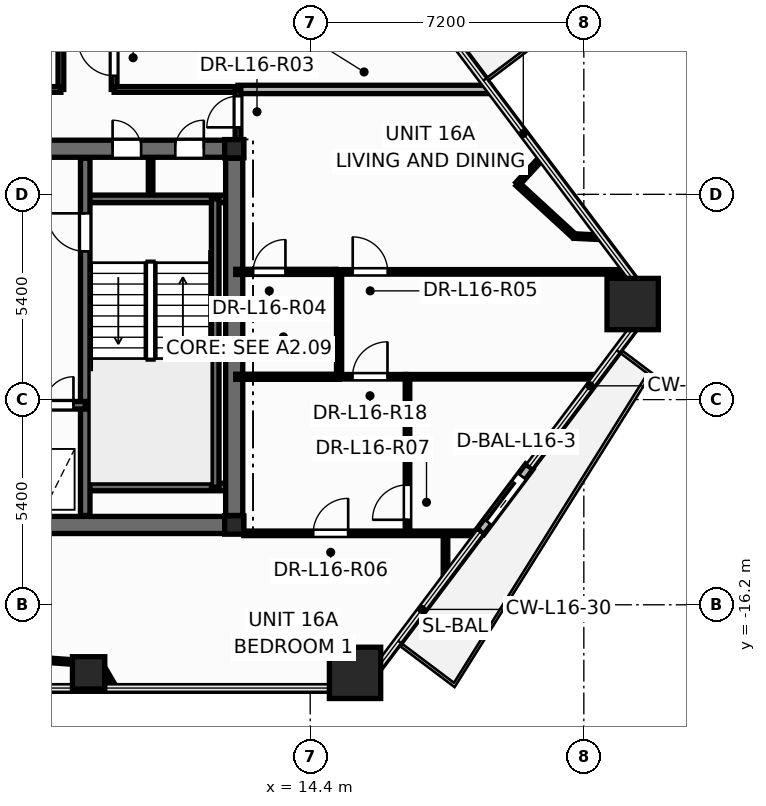
"""IFC4 building model, lengths in metres.
Left out: names, types, materials, properties, quantities, classifications, styles, units other than length and angle.
Written with IfcOpenShell. Run it as: python <this file> out.ifc"""

import sys

from ifc_helpers import new_model, si_unit, direction, frame, frame_2d, origin, origin_2d, place, context, subcontext, project, spatial, rectangle, hollow_rectangle, hollow_circle, i_section, extrude, element, fill, save


model = new_model("IFC4")
c1 = context("Model", 3, precision=1e-05, world=origin(), true_north=direction((0.0, 1.0)))
c2 = subcontext(c1, "Body", "Model", "MODEL_VIEW")
j1 = project(units=[si_unit("LENGTHUNIT", "METRE"), si_unit("PLANEANGLEUNIT", "RADIAN")], contexts=[c1])
p1 = place(None, origin())
s1 = spatial("IfcSite", under=j1, at=p1, CompositionType="ELEMENT")
p2 = place(p1, origin())
s2 = spatial("IfcBuilding", under=s1, at=p2, CompositionType="ELEMENT")
p3 = place(p2, frame((0.0, 0.0, 64.8)))
s3 = spatial("IfcBuildingStorey", under=s2, at=p3, CompositionType="ELEMENT", Elevation=64.8)
for number, where, z_axis, x_axis in (
    (1, (15.58, -17.991, 0.0), (0.0, 0.0, 1.0), (1.0, 0.0, 0.0)),
    (2, (22.885, -8.287, 0.0), (0.0, 0.0, 1.0), (1.0, 0.0, 0.0)),
):
    element("IfcColumn", number, at=place(p3, frame(where, z_axis=z_axis, x_axis=x_axis)), inside=s3, PredefinedType="COLUMN", context=c2, shape_type="SweptSolid", body=[
        extrude(hollow_rectangle(XDim=1.35, YDim=1.35, WallThickness=0.065, at=origin_2d()), origin(), (0.0, 0.0, 1.0), 3.6),
    ])
p4 = place(p3, frame((8.569, -17.991, 0.0), z_axis=(0.0, 0.0, 1.0), x_axis=(1.0, 0.0, 0.0)))
e3 = element("IfcColumn", 3, at=p4, inside=s3, PredefinedType="COLUMN", context=c2, shape_type="SweptSolid", body=[
    extrude(hollow_circle(Radius=0.425, WallThickness=0.038, at=origin_2d()), origin(), (0.0, 0.0, 1.0), 3.6),
])
for number, where, z_axis, x_axis in (
    (4, (12.4, -14.1, 0.0), (0.0, 0.0, 1.0), (1.0, 0.0, 0.0)),
    (5, (12.4, -4.2, 0.0), (0.0, 0.0, 1.0), (1.0, 0.0, 0.0)),
):
    element("IfcColumn", number, at=place(p3, frame(where, z_axis=z_axis, x_axis=x_axis)), inside=s3, PredefinedType="COLUMN", context=c2, shape_type="SweptSolid", body=[
        extrude(i_section(OverallWidth=0.5, OverallDepth=0.482, WebThickness=0.04, FlangeThickness=0.045, at=origin_2d()), origin(), (0.0, 0.0, 1.0), 3.6),
    ])
p5 = place(p3, frame((18.877, -14.276, -0.015), z_axis=(0.0, 0.0, 1.0), x_axis=(0.601441023505, 0.798917201746, 0.0)))
e6 = element("IfcWall", 6, at=p5, inside=s3, PredefinedType="STANDARD", context=c2, shape_type="SweptSolid", body=[
    extrude(rectangle(XDim=2.14, YDim=0.24, at=frame_2d((1.07, 0.0))), origin(), (0.0, 0.0, 1.0), 2.729),
])
p6 = place(p5, frame((0.32, 0.0, 0.015)))
e7 = element("IfcOpeningElement", 7, at=p6, cuts=e6, PredefinedType="OPENING", context=c2, shape_type="SweptSolid", body=[
    extrude(rectangle(XDim=1.506, YDim=2.204, at=frame_2d((0.75, 1.102))), frame((0.0, 0.13, 0.0), z_axis=(0.0, -1.0, 0.0), x_axis=(1.0, 0.0, 0.0)), (0.0, 0.0, 1.0), 0.26),
])
p7 = place(p3, frame((10.2, -5.52, 0.0), z_axis=(0.0, 0.0, 1.0), x_axis=(0.0, 1.0, 0.0)))
e8 = element("IfcWall", 8, at=p7, inside=s3, PredefinedType="PARTITIONING", context=c2, shape_type="SweptSolid", body=[
    extrude(rectangle(XDim=1.12, YDim=0.12, at=frame_2d((0.56, 0.0))), origin(), (0.0, 0.0, 1.0), 3.35),
])
p8 = place(p3, frame((-12.65, -14.1, 0.0), z_axis=(0.0, 0.0, 1.0), x_axis=(1.0, 0.0, 0.0)))
e9 = element("IfcWall", 9, at=p8, inside=s3, PredefinedType="SHEAR", context=c2, shape_type="SweptSolid", body=[
    extrude(rectangle(XDim=25.3, YDim=0.45, at=frame_2d((12.65, 0.0))), origin(), (0.0, 0.0, 1.0), 3.6),
])
p9 = place(p3, frame((-12.65, -4.2, 0.0), z_axis=(0.0, 0.0, 1.0), x_axis=(1.0, 0.0, 0.0)))
e10 = element("IfcWall", 10, at=p9, inside=s3, PredefinedType="SHEAR", context=c2, shape_type="SweptSolid", body=[
    extrude(rectangle(XDim=25.3, YDim=0.45, at=frame_2d((12.65, 0.0))), origin(), (0.0, 0.0, 1.0), 3.6),
])
p10 = place(p9, frame((1.85, 0.0, 0.0)))
e11 = element("IfcOpeningElement", 11, at=p10, cuts=e10, PredefinedType="OPENING", context=c2, shape_type="SweptSolid", body=[
    extrude(rectangle(XDim=0.756, YDim=2.054, at=frame_2d((0.375, 1.027))), frame((0.0, 0.235, 0.0), z_axis=(0.0, -1.0, 0.0), x_axis=(1.0, 0.0, 0.0)), (0.0, 0.0, 1.0), 0.47),
])
p11 = place(p9, frame((21.85, 0.0, 0.0)))
e12 = element("IfcOpeningElement", 12, at=p11, cuts=e10, PredefinedType="OPENING", context=c2, shape_type="SweptSolid", body=[
    extrude(rectangle(XDim=0.756, YDim=2.054, at=frame_2d((0.375, 1.027))), frame((0.0, 0.235, 0.0), z_axis=(0.0, -1.0, 0.0), x_axis=(1.0, 0.0, 0.0)), (0.0, 0.0, 1.0), 0.47),
])
p12 = place(p9, frame((23.5, 0.0, 0.0)))
e13 = element("IfcOpeningElement", 13, at=p12, cuts=e10, PredefinedType="OPENING", context=c2, shape_type="SweptSolid", body=[
    extrude(rectangle(XDim=0.756, YDim=2.054, at=frame_2d((0.375, 1.027))), frame((0.0, 0.235, 0.0), z_axis=(0.0, -1.0, 0.0), x_axis=(1.0, 0.0, 0.0)), (0.0, 0.0, 1.0), 0.47),
])
p13 = place(p9, frame((5.85, 0.0, 0.0)))
e14 = element("IfcOpeningElement", 14, at=p13, cuts=e10, PredefinedType="OPENING", context=c2, shape_type="SweptSolid", body=[
    extrude(rectangle(XDim=1.006, YDim=2.104, at=frame_2d((0.5, 1.052))), frame((0.0, 0.235, 0.0), z_axis=(0.0, -1.0, 0.0), x_axis=(1.0, 0.0, 0.0)), (0.0, 0.0, 1.0), 0.47),
])
p14 = place(p9, frame((10.35, 0.0, 0.0)))
e15 = element("IfcOpeningElement", 15, at=p14, cuts=e10, PredefinedType="OPENING", context=c2, shape_type="SweptSolid", body=[
    extrude(rectangle(XDim=1.406, YDim=2.154, at=frame_2d((0.7, 1.077))), frame((0.0, 0.235, 0.0), z_axis=(0.0, -1.0, 0.0), x_axis=(1.0, 0.0, 0.0)), (0.0, 0.0, 1.0), 0.47),
])
p15 = place(p9, frame((18.45, 0.0, 0.0)))
e16 = element("IfcOpeningElement", 16, at=p15, cuts=e10, PredefinedType="OPENING", context=c2, shape_type="SweptSolid", body=[
    extrude(rectangle(XDim=1.006, YDim=2.104, at=frame_2d((0.5, 1.052))), frame((0.0, 0.235, 0.0), z_axis=(0.0, -1.0, 0.0), x_axis=(1.0, 0.0, 0.0)), (0.0, 0.0, 1.0), 0.47),
])
for number, where, z_axis, x_axis in (
    (17, (8.48, -5.52, 0.0), (0.0, 0.0, 1.0), (1.0, 0.0, 0.0)),
    (18, (8.48, -13.1, 0.0), (0.0, 0.0, 1.0), (1.0, 0.0, 0.0)),
):
    element("IfcWall", number, at=place(p3, frame(where, z_axis=z_axis, x_axis=x_axis)), inside=s3, PredefinedType="SOLIDWALL", context=c2, shape_type="SweptSolid", body=[
        extrude(rectangle(XDim=3.87, YDim=0.2, at=frame_2d((1.935, 0.0))), origin(), (0.0, 0.0, 1.0), 3.6),
    ])
p16 = place(p3, frame((11.9, -13.1, 0.0), z_axis=(0.0, 0.0, 1.0), x_axis=(0.0, 1.0, 0.0)))
e19 = element("IfcWall", 19, at=p16, inside=s3, PredefinedType="SOLIDWALL", context=c2, shape_type="SweptSolid", body=[
    extrude(rectangle(XDim=7.58, YDim=0.2, at=frame_2d((3.79, 0.0))), origin(), (0.0, 0.0, 1.0), 3.6),
])
p17 = place(p3, frame((8.48, -13.85, 0.0), z_axis=(0.0, 0.0, 1.0), x_axis=(0.0, 1.0, 0.0)))
e20 = element("IfcWall", 20, at=p17, inside=s3, PredefinedType="SHEAR", context=c2, shape_type="SweptSolid", body=[
    extrude(rectangle(XDim=9.4, YDim=0.25, at=frame_2d((4.7, 0.0))), origin(), (0.0, 0.0, 1.0), 3.6),
])
p18 = place(p17, frame((6.95, 0.0, 0.0)))
e21 = element("IfcOpeningElement", 21, at=p18, cuts=e20, PredefinedType="OPENING", context=c2, shape_type="SweptSolid", body=[
    extrude(rectangle(XDim=1.006, YDim=2.104, at=frame_2d((0.5, 1.052))), frame((0.0, 0.135, 0.0), z_axis=(0.0, -1.0, 0.0), x_axis=(1.0, 0.0, 0.0)), (0.0, 0.0, 1.0), 0.27),
])
p19 = place(p3, frame((5.12, -10.95, 0.0), z_axis=(0.0, 0.0, 1.0), x_axis=(1.0, 0.0, 0.0)))
e22 = element("IfcWall", 22, at=p19, inside=s3, PredefinedType="SOLIDWALL", context=c2, shape_type="SweptSolid", body=[
    extrude(rectangle(XDim=3.36, YDim=0.2, at=frame_2d((1.68, 0.0))), origin(), (0.0, 0.0, 1.0), 3.6),
])
p20 = place(p19, frame((0.42, 0.0, 0.0)))
e23 = element("IfcOpeningElement", 23, at=p20, cuts=e22, PredefinedType="OPENING", context=c2, shape_type="SweptSolid", body=[
    extrude(rectangle(XDim=1.106, YDim=2.104, at=frame_2d((0.55, 1.052))), frame((0.0, 0.11, 0.0), z_axis=(0.0, -1.0, 0.0), x_axis=(1.0, 0.0, 0.0)), (0.0, 0.0, 1.0), 0.22),
])
p21 = place(p19, frame((2.3, 0.0, 0.0)))
e24 = element("IfcOpeningElement", 24, at=p21, cuts=e22, PredefinedType="OPENING", context=c2, shape_type="SweptSolid", body=[
    extrude(rectangle(XDim=0.756, YDim=2.054, at=frame_2d((0.375, 1.027))), frame((0.0, 0.11, 0.0), z_axis=(0.0, -1.0, 0.0), x_axis=(1.0, 0.0, 0.0)), (0.0, 0.0, 1.0), 0.22),
])
p22 = place(p3, frame((12.4, -13.85, 0.0), z_axis=(0.0, 0.0, 1.0), x_axis=(0.0, 1.0, 0.0)))
e25 = element("IfcWall", 25, at=p22, inside=s3, PredefinedType="SHEAR", context=c2, shape_type="SweptSolid", body=[
    extrude(rectangle(XDim=9.4, YDim=0.45, at=frame_2d((4.7, 0.0))), origin(), (0.0, 0.0, 1.0), 3.6),
])
p23 = place(p3, frame((15.08, -7.44, 0.0), z_axis=(0.0, 0.0, 1.0), x_axis=(1.0, 0.0, 0.0)))
e26 = element("IfcWall", 26, at=p23, inside=s3, PredefinedType="PARTITIONING", context=c2, shape_type="SweptSolid", body=[
    extrude(rectangle(XDim=7.669, YDim=0.12, at=frame_2d((3.834, 0.0))), origin(), (0.0, 0.0, 1.0), 2.325),
])
p24 = place(p23, frame((0.438, 0.0, 0.0)))
e27 = element("IfcOpeningElement", 27, at=p24, cuts=e26, PredefinedType="OPENING", context=c2, shape_type="SweptSolid", body=[
    extrude(rectangle(XDim=0.926, YDim=2.104, at=frame_2d((0.46, 1.052))), frame((0.0, 0.07, 0.0), z_axis=(0.0, -1.0, 0.0), x_axis=(1.0, 0.0, 0.0)), (0.0, 0.0, 1.0), 0.14),
])
p25 = place(p3, frame((9.24, -2.64, 0.0), z_axis=(0.0, 0.0, 1.0), x_axis=(0.0, 1.0, 0.0)))
e28 = element("IfcWall", 28, at=p25, inside=s3, PredefinedType="PARTITIONING", context=c2, shape_type="SweptSolid", body=[
    extrude(rectangle(XDim=7.1, YDim=0.15, at=frame_2d((3.55, 0.0))), origin(), (0.0, 0.0, 1.0), 2.325),
])
p26 = place(p25, frame((0.36, 0.0, 0.0)))
e29 = element("IfcOpeningElement", 29, at=p26, cuts=e28, PredefinedType="OPENING", context=c2, shape_type="SweptSolid", body=[
    extrude(rectangle(XDim=0.956, YDim=2.104, at=frame_2d((0.475, 1.052))), frame((0.0, 0.085, 0.0), z_axis=(0.0, -1.0, 0.0), x_axis=(1.0, 0.0, 0.0)), (0.0, 0.0, 1.0), 0.17),
])
p27 = place(p3, frame((12.5, -2.64, 0.0), z_axis=(0.0, 0.0, 1.0), x_axis=(1.0, 0.0, 0.0)))
e30 = element("IfcWall", 30, at=p27, inside=s3, PredefinedType="PARTITIONING", context=c2, shape_type="SweptSolid", body=[
    extrude(rectangle(XDim=6.635, YDim=0.22, at=frame_2d((3.318, 0.0))), origin(), (0.0, 0.0, 1.0), 2.713),
])
p28 = place(p3, frame((12.652, -14.32, 0.0), z_axis=(0.0, 0.0, 1.0), x_axis=(1.0, 0.0, 0.0)))
e31 = element("IfcWall", 31, at=p28, inside=s3, PredefinedType="PARTITIONING", context=c2, shape_type="SweptSolid", body=[
    extrude(rectangle(XDim=6.192, YDim=0.12, at=frame_2d((3.096, 0.0))), origin(), (0.0, 0.0, 1.0), 2.713),
])
p29 = place(p28, frame((1.827, 0.0, 0.0)))
e32 = element("IfcOpeningElement", 32, at=p29, cuts=e31, PredefinedType="OPENING", context=c2, shape_type="SweptSolid", body=[
    extrude(rectangle(XDim=0.926, YDim=2.104, at=frame_2d((0.46, 1.052))), frame((0.0, 0.07, 0.0), z_axis=(0.0, -1.0, 0.0), x_axis=(1.0, 0.0, 0.0)), (0.0, 0.0, 1.0), 0.14),
])
p30 = place(p3, frame((7.84, -2.64, 0.0), z_axis=(0.0, 0.0, 1.0), x_axis=(0.0, 1.0, 0.0)))
e33 = element("IfcWall", 33, at=p30, inside=s3, PredefinedType="PARTITIONING", context=c2, shape_type="SweptSolid", body=[
    extrude(rectangle(XDim=8.84, YDim=0.15, at=frame_2d((4.42, 0.0))), origin(), (0.0, 0.0, 1.0), 2.325),
])
p31 = place(p3, frame((16.92, -10.2, 0.0), z_axis=(0.0, 0.0, 1.0), x_axis=(1.0, 0.0, 0.0)))
e34 = element("IfcWall", 34, at=p31, inside=s3, PredefinedType="PARTITIONING", context=c2, shape_type="SweptSolid", body=[
    extrude(rectangle(XDim=5.026, YDim=0.12, at=frame_2d((2.513, 0.0))), origin(), (0.0, 0.0, 1.0), 2.713),
])
p32 = place(p3, frame((16.96, -14.32, 0.0), z_axis=(0.0, 0.0, 1.0), x_axis=(0.0, 1.0, 0.0)))
e35 = element("IfcWall", 35, at=p32, inside=s3, PredefinedType="PARTITIONING", context=c2, shape_type="SweptSolid", body=[
    extrude(rectangle(XDim=4.12, YDim=0.12, at=frame_2d((2.06, 0.0))), origin(), (0.0, 0.0, 1.0), 3.35),
])
p33 = place(p32, frame((0.357, 0.0, 0.0)))
e36 = element("IfcOpeningElement", 36, at=p33, cuts=e35, PredefinedType="OPENING", context=c2, shape_type="SweptSolid", body=[
    extrude(rectangle(XDim=0.926, YDim=2.104, at=frame_2d((0.46, 1.052))), frame((0.0, 0.07, 0.0), z_axis=(0.0, -1.0, 0.0), x_axis=(1.0, 0.0, 0.0)), (0.0, 0.0, 1.0), 0.14),
])
p34 = place(p3, frame((5.595, -17.522, 0.0), z_axis=(0.0, 0.0, 1.0), x_axis=(0.997421304673, -0.071768662969, 0.0)))
e37 = element("IfcWall", 37, at=p34, inside=s3, PredefinedType="PARTITIONING", context=c2, shape_type="SweptSolid", body=[
    extrude(rectangle(XDim=3.293, YDim=0.12, at=frame_2d((1.646, 0.0))), origin(), (0.0, 0.0, 1.0), 2.325),
])
p35 = place(p3, frame((9.24, -2.64, 0.0), z_axis=(0.0, 0.0, 1.0), x_axis=(1.0, 0.0, 0.0)))
e38 = element("IfcWall", 38, at=p35, inside=s3, PredefinedType="PARTITIONING", context=c2, shape_type="SweptSolid", body=[
    extrude(rectangle(XDim=3.26, YDim=0.15, at=frame_2d((1.63, 0.0))), origin(), (0.0, 0.0, 1.0), 3.35),
])
p36 = place(p3, frame((12.44, -7.44, 0.0), z_axis=(0.0, 0.0, 1.0), x_axis=(1.0, 0.0, 0.0)))
e39 = element("IfcWall", 39, at=p36, inside=s3, PredefinedType="PARTITIONING", context=c2, shape_type="SweptSolid", body=[
    extrude(rectangle(XDim=2.638, YDim=0.135, at=frame_2d((1.319, 0.0))), origin(), (0.0, 0.0, 1.0), 2.713),
])
p37 = place(p36, frame((0.458, 0.0, 0.0)))
e40 = element("IfcOpeningElement", 40, at=p37, cuts=e39, PredefinedType="OPENING", context=c2, shape_type="SweptSolid", body=[
    extrude(rectangle(XDim=0.856, YDim=2.104, at=frame_2d((0.425, 1.052))), frame((0.0, 0.078, 0.0), z_axis=(0.0, -1.0, 0.0), x_axis=(1.0, 0.0, 0.0)), (0.0, 0.0, 1.0), 0.155),
])
p38 = place(p3, frame((15.16, -10.2, 0.0), z_axis=(0.0, 0.0, 1.0), x_axis=(0.0, 1.0, 0.0)))
e41 = element("IfcWall", 41, at=p38, inside=s3, PredefinedType="PARTITIONING", context=c2, shape_type="SweptSolid", body=[
    extrude(rectangle(XDim=2.76, YDim=0.135, at=frame_2d((1.38, 0.0))), origin(), (0.0, 0.0, 1.0), 3.35),
])
p39 = place(p3, frame((12.44, -10.2, 0.0), z_axis=(0.0, 0.0, 1.0), x_axis=(1.0, 0.0, 0.0)))
e42 = element("IfcWall", 42, at=p39, inside=s3, PredefinedType="PARTITIONING", context=c2, shape_type="SweptSolid", body=[
    extrude(rectangle(XDim=2.72, YDim=0.135, at=frame_2d((1.36, 0.0))), origin(), (0.0, 0.0, 1.0), 2.713),
])
p40 = place(p3, frame((6.002, -2.64, 0.0), z_axis=(0.0, 0.0, 1.0), x_axis=(1.0, 0.0, 0.0)))
e43 = element("IfcWall", 43, at=p40, inside=s3, PredefinedType="PARTITIONING", context=c2, shape_type="SweptSolid", body=[
    extrude(rectangle(XDim=1.838, YDim=0.15, at=frame_2d((0.919, 0.0))), origin(), (0.0, 0.0, 1.0), 2.325),
])
p41 = place(p3, frame((15.16, -10.2, 0.0), z_axis=(0.0, 0.0, 1.0), x_axis=(1.0, 0.0, 0.0)))
e44 = element("IfcWall", 44, at=p41, inside=s3, PredefinedType="PARTITIONING", context=c2, shape_type="SweptSolid", body=[
    extrude(rectangle(XDim=1.758, YDim=0.12, at=frame_2d((0.879, 0.0))), origin(), (0.0, 0.0, 1.0), 3.35),
])
p42 = place(p41, frame((0.353, 0.0, 0.0)))
e45 = element("IfcOpeningElement", 45, at=p42, cuts=e44, PredefinedType="OPENING", context=c2, shape_type="SweptSolid", body=[
    extrude(rectangle(XDim=0.926, YDim=2.104, at=frame_2d((0.46, 1.052))), frame((0.0, 0.07, 0.0), z_axis=(0.0, -1.0, 0.0), x_axis=(1.0, 0.0, 0.0)), (0.0, 0.0, 1.0), 0.14),
])
p43 = place(p3, frame((12.5, -4.24, 0.0), z_axis=(0.0, 0.0, 1.0), x_axis=(0.0, 1.0, 0.0)))
e46 = element("IfcWall", 46, at=p43, inside=s3, PredefinedType="PARTITIONING", context=c2, shape_type="SweptSolid", body=[
    extrude(rectangle(XDim=1.6, YDim=0.15, at=frame_2d((0.8, 0.0))), origin(), (0.0, 0.0, 1.0), 2.325),
])
p44 = place(p43, frame((0.602, 0.0, 0.0)))
e47 = element("IfcOpeningElement", 47, at=p44, cuts=e46, PredefinedType="OPENING", context=c2, shape_type="SweptSolid", body=[
    extrude(rectangle(XDim=0.826, YDim=2.104, at=frame_2d((0.41, 1.052))), frame((0.0, 0.085, 0.0), z_axis=(0.0, -1.0, 0.0), x_axis=(1.0, 0.0, 0.0)), (0.0, 0.0, 1.0), 0.17),
])
p45 = place(p3, frame((21.347, -6.497, 0.0), z_axis=(0.0, 0.0, 1.0), x_axis=(-0.736728490611, 0.67618868012, 0.0)))
e48 = element("IfcWall", 48, at=p45, inside=s3, PredefinedType="PARTITIONING", context=c2, shape_type="SweptSolid", body=[
    extrude(rectangle(XDim=2.024, YDim=0.12, at=frame_2d((1.012, 0.0))), origin(), (0.0, 0.0, 1.0), 3.35),
])
p46 = place(p3, frame((17.96, -15.494, 0.0), z_axis=(0.0, 0.0, 1.0), x_axis=(0.0, 1.0, 0.0)))
e49 = element("IfcWall", 49, at=p46, inside=s3, PredefinedType="PARTITIONING", context=c2, shape_type="SweptSolid", body=[
    extrude(rectangle(XDim=1.174, YDim=0.12, at=frame_2d((0.587, 0.0))), origin(), (0.0, 0.0, 1.0), 2.713),
])
p47 = place(p3, frame((19.855, -5.128, 0.0), z_axis=(0.0, 0.0, 1.0), x_axis=(0.676154076812, 0.736760248935, 0.0)))
e50 = element("IfcWall", 50, at=p47, inside=s3, PredefinedType="PARTITIONING", context=c2, shape_type="SweptSolid", body=[
    extrude(rectangle(XDim=0.927, YDim=0.12, at=frame_2d((0.463, 0.0))), origin(), (0.0, 0.0, 1.0), 2.713),
])
p48 = place(p3, frame((8.879, -17.759, 0.0), z_axis=(0.0, 0.0, 1.0), x_axis=(0.504649985928, -0.863324036329, 0.0)))
e51 = element("IfcWall", 51, at=p48, inside=s3, PredefinedType="PARTITIONING", context=c2, shape_type="SweptSolid", body=[
    extrude(rectangle(XDim=0.721, YDim=0.12, at=frame_2d((0.36, 0.0))), origin(), (0.0, 0.0, 1.0), 2.325),
])
p49 = place(p3, frame((22.053, -6.532, 0.0), z_axis=(0.0, 0.0, 1.0), x_axis=(-0.998778903867, 0.049403453218, 0.0)))
e52 = element("IfcWall", 52, at=p49, inside=s3, PredefinedType="PARTITIONING", context=c2, shape_type="SweptSolid", body=[
    extrude(rectangle(XDim=0.707, YDim=0.12, at=frame_2d((0.354, 0.0))), origin(), (0.0, 0.0, 1.0), 2.713),
])
p50 = place(p6, origin())
e53 = element("IfcDoor", 53, at=p50, inside=s3, OperationType="SLIDING_TO_RIGHT", PredefinedType="DOOR", context=c2, shape_type="SweptSolid", body=[
    extrude(rectangle(XDim=1.5, YDim=2.2, at=frame_2d((0.75, 1.1))), frame((0.0, 0.025, 0.0), z_axis=(0.0, -1.0, 0.0), x_axis=(1.0, 0.0, 0.0)), (0.0, 0.0, 1.0), 0.05),
])
fill(e7, e53)
p51 = place(p18, origin())
e54 = element("IfcDoor", 54, at=p51, inside=s3, OperationType="SINGLE_SWING_RIGHT", PredefinedType="DOOR", context=c2, shape_type="SweptSolid", body=[
    extrude(rectangle(XDim=1.0, YDim=2.1, at=frame_2d((0.5, 1.05))), frame((0.0, 0.025, 0.0), z_axis=(0.0, -1.0, 0.0), x_axis=(1.0, 0.0, 0.0)), (0.0, 0.0, 1.0), 0.05),
])
fill(e21, e54)
p52 = place(p21, origin())
e55 = element("IfcDoor", 55, at=p52, inside=s3, OperationType="SINGLE_SWING_RIGHT", PredefinedType="DOOR", context=c2, shape_type="SweptSolid", body=[
    extrude(rectangle(XDim=0.75, YDim=2.05, at=frame_2d((0.375, 1.025))), frame((0.0, 0.025, 0.0), z_axis=(0.0, -1.0, 0.0), x_axis=(1.0, 0.0, 0.0)), (0.0, 0.0, 1.0), 0.05),
])
fill(e24, e55)
p53 = place(p11, origin())
e56 = element("IfcDoor", 56, at=p53, inside=s3, OperationType="SINGLE_SWING_LEFT", PredefinedType="DOOR", context=c2, shape_type="SweptSolid", body=[
    extrude(rectangle(XDim=0.75, YDim=2.05, at=frame_2d((0.375, 1.025))), frame((0.0, 0.025, 0.0), z_axis=(0.0, -1.0, 0.0), x_axis=(1.0, 0.0, 0.0)), (0.0, 0.0, 1.0), 0.05),
])
fill(e12, e56)
p54 = place(p12, origin())
e57 = element("IfcDoor", 57, at=p54, inside=s3, OperationType="SINGLE_SWING_RIGHT", PredefinedType="DOOR", context=c2, shape_type="SweptSolid", body=[
    extrude(rectangle(XDim=0.75, YDim=2.05, at=frame_2d((0.375, 1.025))), frame((0.0, 0.025, 0.0), z_axis=(0.0, -1.0, 0.0), x_axis=(1.0, 0.0, 0.0)), (0.0, 0.0, 1.0), 0.05),
])
fill(e13, e57)
p55 = place(p44, origin())
e58 = element("IfcDoor", 58, at=p55, inside=s3, OperationType="SINGLE_SWING_LEFT", PredefinedType="DOOR", context=c2, shape_type="SweptSolid", body=[
    extrude(rectangle(XDim=0.82, YDim=2.1, at=frame_2d((0.41, 1.05))), frame((0.0, 0.025, 0.0), z_axis=(0.0, -1.0, 0.0), x_axis=(1.0, 0.0, 0.0)), (0.0, 0.0, 1.0), 0.05),
])
fill(e47, e58)
p56 = place(p37, origin())
e59 = element("IfcDoor", 59, at=p56, inside=s3, OperationType="SINGLE_SWING_RIGHT", PredefinedType="DOOR", context=c2, shape_type="SweptSolid", body=[
    extrude(rectangle(XDim=0.85, YDim=2.1, at=frame_2d((0.425, 1.05))), frame((0.0, 0.025, 0.0), z_axis=(0.0, -1.0, 0.0), x_axis=(1.0, 0.0, 0.0)), (0.0, 0.0, 1.0), 0.05),
])
fill(e40, e59)
p57 = place(p24, origin())
e60 = element("IfcDoor", 60, at=p57, inside=s3, OperationType="SINGLE_SWING_LEFT", PredefinedType="DOOR", context=c2, shape_type="SweptSolid", body=[
    extrude(rectangle(XDim=0.92, YDim=2.1, at=frame_2d((0.46, 1.05))), frame((0.0, 0.025, 0.0), z_axis=(0.0, -1.0, 0.0), x_axis=(1.0, 0.0, 0.0)), (0.0, 0.0, 1.0), 0.05),
])
fill(e27, e60)
p58 = place(p29, origin())
e61 = element("IfcDoor", 61, at=p58, inside=s3, OperationType="SINGLE_SWING_RIGHT", PredefinedType="DOOR", context=c2, shape_type="SweptSolid", body=[
    extrude(rectangle(XDim=0.92, YDim=2.1, at=frame_2d((0.46, 1.05))), frame((0.0, 0.025, 0.0), z_axis=(0.0, -1.0, 0.0), x_axis=(1.0, 0.0, 0.0)), (0.0, 0.0, 1.0), 0.05),
])
fill(e32, e61)
p59 = place(p33, origin())
e62 = element("IfcDoor", 62, at=p59, inside=s3, OperationType="SINGLE_SWING_LEFT", PredefinedType="DOOR", context=c2, shape_type="SweptSolid", body=[
    extrude(rectangle(XDim=0.92, YDim=2.1, at=frame_2d((0.46, 1.05))), frame((0.0, 0.025, 0.0), z_axis=(0.0, -1.0, 0.0), x_axis=(1.0, 0.0, 0.0)), (0.0, 0.0, 1.0), 0.05),
])
fill(e36, e62)
p60 = place(p26, origin())
e63 = element("IfcDoor", 63, at=p60, inside=s3, OperationType="SINGLE_SWING_RIGHT", PredefinedType="DOOR", context=c2, shape_type="SweptSolid", body=[
    extrude(rectangle(XDim=0.95, YDim=2.1, at=frame_2d((0.475, 1.05))), frame((0.0, 0.025, 0.0), z_axis=(0.0, -1.0, 0.0), x_axis=(1.0, 0.0, 0.0)), (0.0, 0.0, 1.0), 0.05),
])
fill(e29, e63)
p61 = place(p42, origin())
e64 = element("IfcDoor", 64, at=p61, inside=s3, OperationType="SINGLE_SWING_RIGHT", PredefinedType="DOOR", context=c2, shape_type="SweptSolid", body=[
    extrude(rectangle(XDim=0.92, YDim=2.1, at=frame_2d((0.46, 1.05))), frame((0.0, 0.025, 0.0), z_axis=(0.0, -1.0, 0.0), x_axis=(1.0, 0.0, 0.0)), (0.0, 0.0, 1.0), 0.05),
])
fill(e45, e64)
save(model, sys.argv[1])
